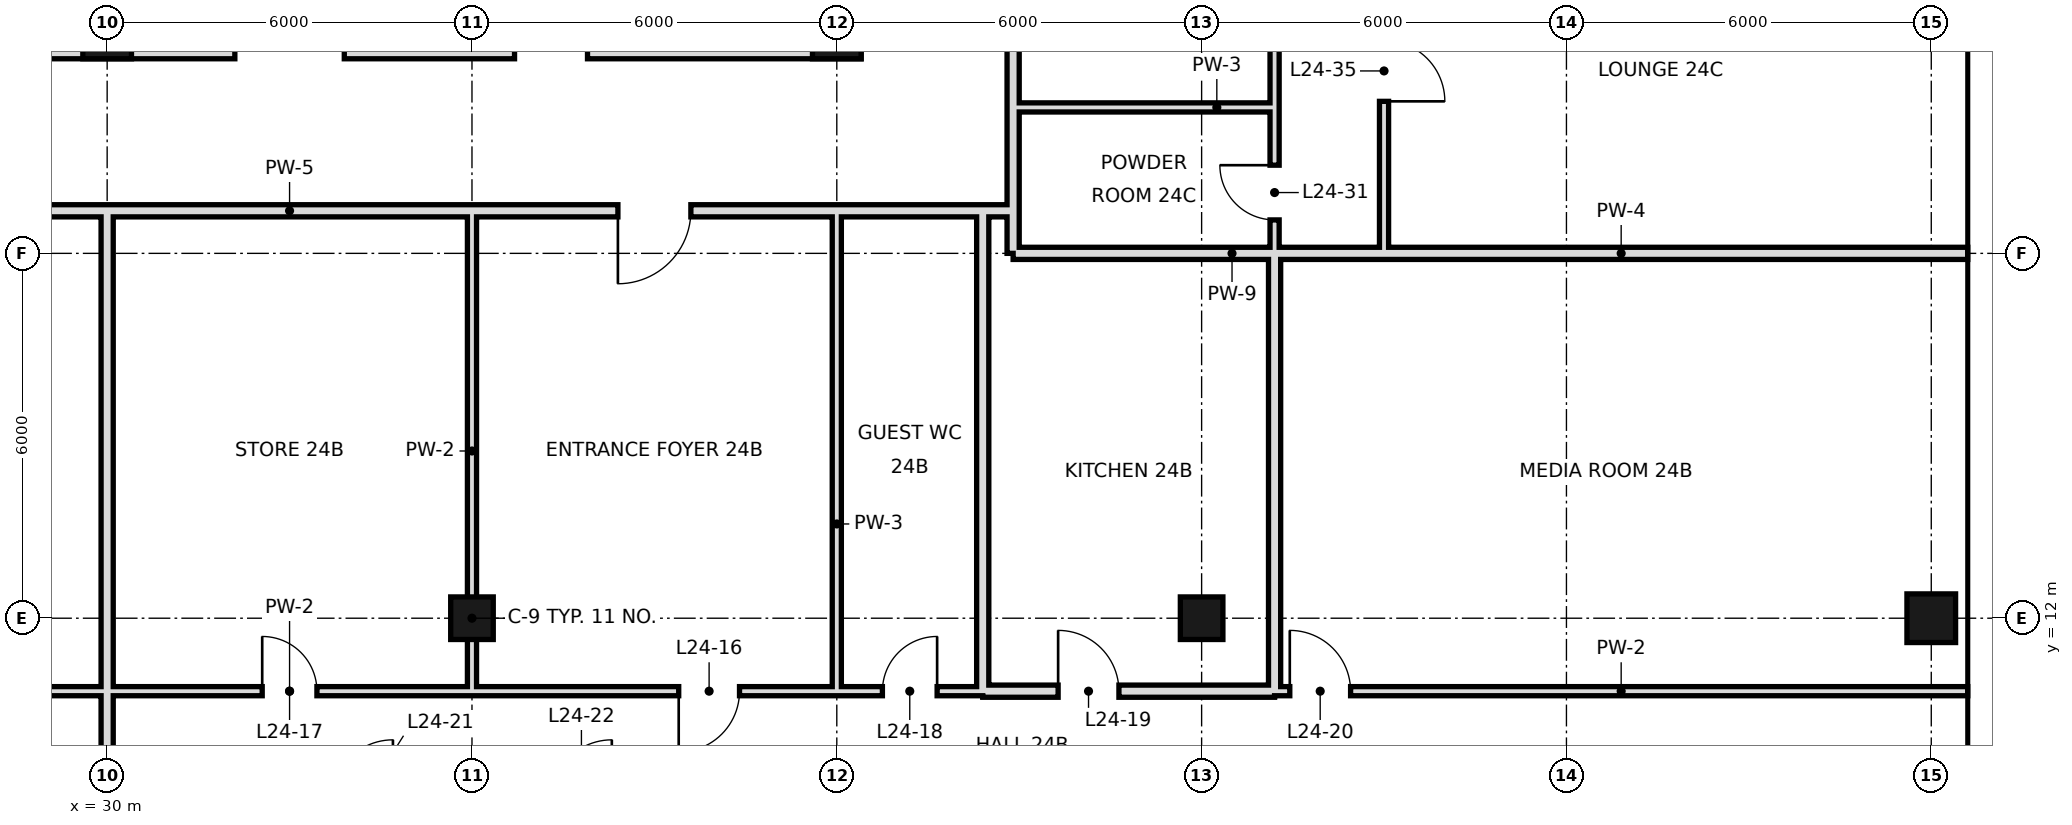
"""IFC4 building model, lengths in metres.
Left out: names, types, materials, properties, quantities, classifications, styles, units other than length and angle.
Written with IfcOpenShell. Run it as: python <this file> out.ifc"""

import sys

from ifc_helpers import new_model, si_unit, direction, frame, frame_2d, origin, origin_2d, place, context, subcontext, project, spatial, rectangle, hollow_rectangle, extrude, element, fill, save


model = new_model("IFC4")
c1 = context("Model", 3, precision=1e-05, world=origin(), true_north=direction((0.0, 1.0)))
c2 = subcontext(c1, "Body", "Model", "MODEL_VIEW")
j1 = project(units=[si_unit("LENGTHUNIT", "METRE"), si_unit("PLANEANGLEUNIT", "RADIAN")], contexts=[c1])
p1 = place(None, origin())
s1 = spatial("IfcSite", under=j1, at=p1, CompositionType="ELEMENT")
p2 = place(p1, origin())
s2 = spatial("IfcBuilding", under=s1, at=p2, CompositionType="ELEMENT")
p3 = place(p2, frame((0.0, 0.0, 110.6)))
s3 = spatial("IfcBuildingStorey", under=s2, at=p3, CompositionType="ELEMENT", Elevation=110.6)
p4 = place(p3, frame((30.0, 21.6, 0.0), z_axis=(0.0, 0.0, 1.0), x_axis=(1.0, 0.0, 0.0)))
e1 = element("IfcColumn", 1, at=p4, inside=s3, PredefinedType="COLUMN", context=c2, shape_type="SweptSolid", body=[
    extrude(hollow_rectangle(XDim=0.8, YDim=0.8, WallThickness=0.05, at=origin_2d()), origin(), (0.0, 0.0, 1.0), 3.6),
])
p5 = place(p3, frame((36.0, 12.0, 0.0), z_axis=(0.0, 0.0, 1.0), x_axis=(1.0, 0.0, 0.0)))
e2 = element("IfcColumn", 2, at=p5, inside=s3, PredefinedType="COLUMN", context=c2, shape_type="SweptSolid", body=[
    extrude(hollow_rectangle(XDim=0.7, YDim=0.7, WallThickness=0.036, at=origin_2d()), origin(), (0.0, 0.0, 1.0), 3.6),
])
p6 = place(p3, frame((42.0, 21.6, 0.0), z_axis=(0.0, 0.0, 1.0), x_axis=(1.0, 0.0, 0.0)))
e3 = element("IfcColumn", 3, at=p6, inside=s3, PredefinedType="COLUMN", context=c2, shape_type="SweptSolid", body=[
    extrude(hollow_rectangle(XDim=0.8, YDim=0.8, WallThickness=0.05, at=origin_2d()), origin(), (0.0, 0.0, 1.0), 3.6),
])
p7 = place(p3, frame((48.0, 12.0, 0.0), z_axis=(0.0, 0.0, 1.0), x_axis=(1.0, 0.0, 0.0)))
e4 = element("IfcColumn", 4, at=p7, inside=s3, PredefinedType="COLUMN", context=c2, shape_type="SweptSolid", body=[
    extrude(hollow_rectangle(XDim=0.7, YDim=0.7, WallThickness=0.036, at=origin_2d()), origin(), (0.0, 0.0, 1.0), 3.6),
])
p8 = place(p3, frame((60.0, 12.0, 0.0), z_axis=(0.0, 0.0, 1.0), x_axis=(1.0, 0.0, 0.0)))
e5 = element("IfcColumn", 5, at=p8, inside=s3, PredefinedType="COLUMN", context=c2, shape_type="SweptSolid", body=[
    extrude(hollow_rectangle(XDim=0.8, YDim=0.8, WallThickness=0.04, at=origin_2d()), origin(), (0.0, 0.0, 1.0), 3.6),
])
p9 = place(p3, frame((30.0, -0.6, 0.0), z_axis=(0.0, 0.0, 1.0), x_axis=(0.0, 1.0, 0.0)))
e6 = element("IfcWall", 6, at=p9, inside=s3, PredefinedType="SOLIDWALL", context=c2, shape_type="SweptSolid", body=[
    extrude(rectangle(XDim=19.3, YDim=0.2, at=frame_2d((9.65, 0.0))), origin(), (0.0, 0.0, 1.0), 2.68),
])
for number, where, z_axis, x_axis in (
    (7, (36.0, 10.8, 0.0), (0.0, 0.0, 1.0), (0.0, 1.0, 0.0)),
    (8, (42.0, 10.8, 0.0), (0.0, 0.0, 1.0), (0.0, 1.0, 0.0)),
):
    element("IfcWall", number, at=place(p3, frame(where, z_axis=z_axis, x_axis=x_axis)), inside=s3, PredefinedType="PARTITIONING", context=c2, shape_type="SweptSolid", body=[
        extrude(rectangle(XDim=7.9, YDim=0.15, at=frame_2d((3.95, 0.0))), origin(), (0.0, 0.0, 1.0), 2.68),
    ])
p10 = place(p3, frame((44.4, 10.8, 0.0), z_axis=(0.0, 0.0, 1.0), x_axis=(0.0, 1.0, 0.0)))
e9 = element("IfcWall", 9, at=p10, inside=s3, PredefinedType="SOLIDWALL", context=c2, shape_type="SweptSolid", body=[
    extrude(rectangle(XDim=7.9, YDim=0.2, at=frame_2d((3.95, 0.0))), origin(), (0.0, 0.0, 1.0), 2.68),
])
p11 = place(p3, frame((44.9, 18.7, 0.0), z_axis=(0.0, 0.0, 1.0), x_axis=(0.0, 1.0, 0.0)))
e10 = element("IfcWall", 10, at=p11, inside=s3, PredefinedType="SOLIDWALL", context=c2, shape_type="SweptSolid", body=[
    extrude(rectangle(XDim=19.7, YDim=0.2, at=frame_2d((9.85, 0.0))), origin(), (0.0, 0.0, 1.0), 2.93),
])
p12 = place(p11, frame((16.96, 0.0, 0.0)))
e11 = element("IfcOpeningElement", 11, at=p12, cuts=e10, PredefinedType="OPENING", context=c2, shape_type="SweptSolid", body=[
    extrude(rectangle(XDim=1.2, YDim=2.4, at=frame_2d((0.6, 1.2))), frame((0.0, 0.11, 0.0), z_axis=(0.0, -1.0, 0.0), x_axis=(1.0, 0.0, 0.0)), (0.0, 0.0, 1.0), 0.22),
])
p13 = place(p3, frame((44.9, 18.0, 0.0), z_axis=(0.0, 0.0, 1.0), x_axis=(0.0, 1.0, 0.0)))
e12 = element("IfcWall", 12, at=p13, inside=s3, PredefinedType="SOLIDWALL", context=c2, shape_type="SweptSolid", body=[
    extrude(rectangle(XDim=0.7, YDim=0.2, at=frame_2d((0.35, 0.0))), origin(), (0.0, 0.0, 1.0), 2.93),
])
p14 = place(p3, frame((49.2, 10.8, 0.0), z_axis=(0.0, 0.0, 1.0), x_axis=(0.0, 1.0, 0.0)))
e13 = element("IfcWall", 13, at=p14, inside=s3, PredefinedType="SOLIDWALL", context=c2, shape_type="SweptSolid", body=[
    extrude(rectangle(XDim=7.2, YDim=0.2, at=frame_2d((3.6, 0.0))), origin(), (0.0, 0.0, 1.0), 2.68),
])
p15 = place(p3, frame((49.2, 20.4, 0.0), z_axis=(0.0, 0.0, 1.0), x_axis=(0.0, 1.0, 0.0)))
e14 = element("IfcWall", 14, at=p15, inside=s3, PredefinedType="PARTITIONING", context=c2, shape_type="SweptSolid", body=[
    extrude(rectangle(XDim=18.0, YDim=0.15, at=frame_2d((9.0, 0.0))), origin(), (0.0, 0.0, 1.0), 3.38),
])
p16 = place(p15, frame((13.6, 0.0, 0.0)))
e15 = element("IfcOpeningElement", 15, at=p16, cuts=e14, PredefinedType="OPENING", context=c2, shape_type="SweptSolid", body=[
    extrude(rectangle(XDim=1.0, YDim=2.4, at=frame_2d((0.5, 1.2))), frame((0.0, 0.085, 0.0), z_axis=(0.0, -1.0, 0.0), x_axis=(1.0, 0.0, 0.0)), (0.0, 0.0, 1.0), 0.17),
])
p17 = place(p15, frame((7.6, 0.0, 0.0)))
e16 = element("IfcOpeningElement", 16, at=p17, cuts=e14, PredefinedType="OPENING", context=c2, shape_type="SweptSolid", body=[
    extrude(rectangle(XDim=1.0, YDim=2.4, at=frame_2d((0.5, 1.2))), frame((0.0, 0.085, 0.0), z_axis=(0.0, -1.0, 0.0), x_axis=(1.0, 0.0, 0.0)), (0.0, 0.0, 1.0), 0.17),
])
p18 = place(p3, frame((49.2, 18.0, 0.0), z_axis=(0.0, 0.0, 1.0), x_axis=(0.0, 1.0, 0.0)))
e17 = element("IfcWall", 17, at=p18, inside=s3, PredefinedType="PARTITIONING", context=c2, shape_type="SweptSolid", body=[
    extrude(rectangle(XDim=2.4, YDim=0.15, at=frame_2d((1.2, 0.0))), origin(), (0.0, 0.0, 1.0), 3.38),
])
p19 = place(p18, frame((0.55, 0.0, 0.0)))
e18 = element("IfcOpeningElement", 18, at=p19, cuts=e17, PredefinedType="OPENING", context=c2, shape_type="SweptSolid", body=[
    extrude(rectangle(XDim=0.9, YDim=2.4, at=frame_2d((0.45, 1.2))), frame((0.0, 0.085, 0.0), z_axis=(0.0, -1.0, 0.0), x_axis=(1.0, 0.0, 0.0)), (0.0, 0.0, 1.0), 0.17),
])
p20 = place(p3, frame((51.0, 18.0, 0.0), z_axis=(0.0, 0.0, 1.0), x_axis=(0.0, 1.0, 0.0)))
e19 = element("IfcWall", 19, at=p20, inside=s3, PredefinedType="PARTITIONING", context=c2, shape_type="SweptSolid", body=[
    extrude(rectangle(XDim=8.4, YDim=0.15, at=frame_2d((4.2, 0.0))), origin(), (0.0, 0.0, 1.0), 3.38),
])
p21 = place(p20, frame((2.5, 0.0, 0.0)))
e20 = element("IfcOpeningElement", 20, at=p21, cuts=e19, PredefinedType="OPENING", context=c2, shape_type="SweptSolid", body=[
    extrude(rectangle(XDim=1.0, YDim=2.4, at=frame_2d((0.5, 1.2))), frame((0.0, 0.085, 0.0), z_axis=(0.0, -1.0, 0.0), x_axis=(1.0, 0.0, 0.0)), (0.0, 0.0, 1.0), 0.17),
])
p22 = place(p20, frame((6.52, 0.0, 0.0)))
e21 = element("IfcOpeningElement", 21, at=p22, cuts=e19, PredefinedType="OPENING", context=c2, shape_type="SweptSolid", body=[
    extrude(rectangle(XDim=1.0, YDim=2.4, at=frame_2d((0.5, 1.2))), frame((0.0, 0.085, 0.0), z_axis=(0.0, -1.0, 0.0), x_axis=(1.0, 0.0, 0.0)), (0.0, 0.0, 1.0), 0.17),
])
p23 = place(p3, frame((44.4, 10.8, 0.0), z_axis=(0.0, 0.0, 1.0), x_axis=(1.0, 0.0, 0.0)))
e22 = element("IfcWall", 22, at=p23, inside=s3, PredefinedType="SOLIDWALL", context=c2, shape_type="SweptSolid", body=[
    extrude(rectangle(XDim=4.8, YDim=0.2, at=frame_2d((2.4, 0.0))), origin(), (0.0, 0.0, 1.0), 2.68),
])
p24 = place(p23, frame((1.24, 0.0, 0.0)))
e23 = element("IfcOpeningElement", 23, at=p24, cuts=e22, PredefinedType="OPENING", context=c2, shape_type="SweptSolid", body=[
    extrude(rectangle(XDim=1.0, YDim=2.4, at=frame_2d((0.5, 1.2))), frame((0.0, 0.11, 0.0), z_axis=(0.0, -1.0, 0.0), x_axis=(1.0, 0.0, 0.0)), (0.0, 0.0, 1.0), 0.22),
])
p25 = place(p3, frame((24.0, 10.8, 0.0), z_axis=(0.0, 0.0, 1.0), x_axis=(1.0, 0.0, 0.0)))
e24 = element("IfcWall", 24, at=p25, inside=s3, PredefinedType="PARTITIONING", context=c2, shape_type="SweptSolid", body=[
    extrude(rectangle(XDim=18.0, YDim=0.15, at=frame_2d((9.0, 0.0))), origin(), (0.0, 0.0, 1.0), 3.38),
])
p26 = place(p25, frame((2.5, 0.0, 0.0)))
e25 = element("IfcOpeningElement", 25, at=p26, cuts=e24, PredefinedType="OPENING", context=c2, shape_type="SweptSolid", body=[
    extrude(rectangle(XDim=1.0, YDim=2.4, at=frame_2d((0.5, 1.2))), frame((0.0, 0.085, 0.0), z_axis=(0.0, -1.0, 0.0), x_axis=(1.0, 0.0, 0.0)), (0.0, 0.0, 1.0), 0.17),
])
p27 = place(p25, frame((15.4, 0.0, 0.0)))
e26 = element("IfcOpeningElement", 26, at=p27, cuts=e24, PredefinedType="OPENING", context=c2, shape_type="SweptSolid", body=[
    extrude(rectangle(XDim=1.0, YDim=2.4, at=frame_2d((0.5, 1.2))), frame((0.0, 0.085, 0.0), z_axis=(0.0, -1.0, 0.0), x_axis=(1.0, 0.0, 0.0)), (0.0, 0.0, 1.0), 0.17),
])
p28 = place(p25, frame((8.55, 0.0, 0.0)))
e27 = element("IfcOpeningElement", 27, at=p28, cuts=e24, PredefinedType="OPENING", context=c2, shape_type="SweptSolid", body=[
    extrude(rectangle(XDim=0.9, YDim=2.1, at=frame_2d((0.45, 1.05))), frame((0.0, 0.085, 0.0), z_axis=(0.0, -1.0, 0.0), x_axis=(1.0, 0.0, 0.0)), (0.0, 0.0, 1.0), 0.17),
])
p29 = place(p3, frame((49.2, 10.8, 0.0), z_axis=(0.0, 0.0, 1.0), x_axis=(1.0, 0.0, 0.0)))
e28 = element("IfcWall", 28, at=p29, inside=s3, PredefinedType="PARTITIONING", context=c2, shape_type="SweptSolid", body=[
    extrude(rectangle(XDim=11.4, YDim=0.15, at=frame_2d((5.7, 0.0))), origin(), (0.0, 0.0, 1.0), 3.38),
])
p30 = place(p29, frame((0.25, 0.0, 0.0)))
e29 = element("IfcOpeningElement", 29, at=p30, cuts=e28, PredefinedType="OPENING", context=c2, shape_type="SweptSolid", body=[
    extrude(rectangle(XDim=1.0, YDim=2.4, at=frame_2d((0.5, 1.2))), frame((0.0, 0.085, 0.0), z_axis=(0.0, -1.0, 0.0), x_axis=(1.0, 0.0, 0.0)), (0.0, 0.0, 1.0), 0.17),
])
p31 = place(p3, frame((42.0, 10.8, 0.0), z_axis=(0.0, 0.0, 1.0), x_axis=(1.0, 0.0, 0.0)))
e30 = element("IfcWall", 30, at=p31, inside=s3, PredefinedType="PARTITIONING", context=c2, shape_type="SweptSolid", body=[
    extrude(rectangle(XDim=2.4, YDim=0.15, at=frame_2d((1.2, 0.0))), origin(), (0.0, 0.0, 1.0), 3.38),
])
p32 = place(p31, frame((0.75, 0.0, 0.0)))
e31 = element("IfcOpeningElement", 31, at=p32, cuts=e30, PredefinedType="OPENING", context=c2, shape_type="SweptSolid", body=[
    extrude(rectangle(XDim=0.9, YDim=2.4, at=frame_2d((0.45, 1.2))), frame((0.0, 0.085, 0.0), z_axis=(0.0, -1.0, 0.0), x_axis=(1.0, 0.0, 0.0)), (0.0, 0.0, 1.0), 0.17),
])
p33 = place(p3, frame((44.9, 18.0, 0.0), z_axis=(0.0, 0.0, 1.0), x_axis=(1.0, 0.0, 0.0)))
e32 = element("IfcWall", 32, at=p33, inside=s3, PredefinedType="SOLIDWALL", context=c2, shape_type="SweptSolid", body=[
    extrude(rectangle(XDim=4.3, YDim=0.2, at=frame_2d((2.15, 0.0))), origin(), (0.0, 0.0, 1.0), 2.68),
])
p34 = place(p3, frame((49.2, 18.0, 0.0), z_axis=(0.0, 0.0, 1.0), x_axis=(1.0, 0.0, 0.0)))
e33 = element("IfcWall", 33, at=p34, inside=s3, PredefinedType="SOLIDWALL", context=c2, shape_type="SweptSolid", body=[
    extrude(rectangle(XDim=11.4, YDim=0.2, at=frame_2d((5.7, 0.0))), origin(), (0.0, 0.0, 1.0), 2.68),
])
p35 = place(p3, frame((21.6, 18.7, 0.0), z_axis=(0.0, 0.0, 1.0), x_axis=(1.0, 0.0, 0.0)))
e34 = element("IfcWall", 34, at=p35, inside=s3, PredefinedType="SOLIDWALL", context=c2, shape_type="SweptSolid", body=[
    extrude(rectangle(XDim=22.8, YDim=0.2, at=frame_2d((11.4, 0.0))), origin(), (0.0, 0.0, 1.0), 2.68),
])
p36 = place(p35, frame((4.8, 0.0, 0.0)))
e35 = element("IfcOpeningElement", 35, at=p36, cuts=e34, PredefinedType="OPENING", context=c2, shape_type="SweptSolid", body=[
    extrude(rectangle(XDim=1.2, YDim=2.4, at=frame_2d((0.6, 1.2))), frame((0.0, 0.11, 0.0), z_axis=(0.0, -1.0, 0.0), x_axis=(1.0, 0.0, 0.0)), (0.0, 0.0, 1.0), 0.22),
])
p37 = place(p35, frame((16.8, 0.0, 0.0)))
e36 = element("IfcOpeningElement", 36, at=p37, cuts=e34, PredefinedType="OPENING", context=c2, shape_type="SweptSolid", body=[
    extrude(rectangle(XDim=1.2, YDim=2.4, at=frame_2d((0.6, 1.2))), frame((0.0, 0.11, 0.0), z_axis=(0.0, -1.0, 0.0), x_axis=(1.0, 0.0, 0.0)), (0.0, 0.0, 1.0), 0.22),
])
p38 = place(p3, frame((44.4, 18.7, 0.0), z_axis=(0.0, 0.0, 1.0), x_axis=(1.0, 0.0, 0.0)))
e37 = element("IfcWall", 37, at=p38, inside=s3, PredefinedType="SOLIDWALL", context=c2, shape_type="SweptSolid", body=[
    extrude(rectangle(XDim=0.5, YDim=0.2, at=frame_2d((0.25, 0.0))), origin(), (0.0, 0.0, 1.0), 3.38),
])
p39 = place(p3, frame((44.9, 20.4, 0.0), z_axis=(0.0, 0.0, 1.0), x_axis=(1.0, 0.0, 0.0)))
e38 = element("IfcWall", 38, at=p39, inside=s3, PredefinedType="PARTITIONING", context=c2, shape_type="SweptSolid", body=[
    extrude(rectangle(XDim=4.3, YDim=0.15, at=frame_2d((2.15, 0.0))), origin(), (0.0, 0.0, 1.0), 3.38),
])
p40 = place(p3, frame((5.6, 21.4, 0.0), z_axis=(0.0, 0.0, 1.0), x_axis=(1.0, 0.0, 0.0)))
e39 = element("IfcWall", 39, at=p40, inside=s3, PredefinedType="SOLIDWALL", context=c2, shape_type="SweptSolid", body=[
    extrude(rectangle(XDim=36.8, YDim=0.4, at=frame_2d((18.4, 0.0))), origin(), (0.0, 0.0, 1.0), 3.38),
])
p41 = place(p40, frame((8.5, 0.0, 0.0)))
e40 = element("IfcOpeningElement", 40, at=p41, cuts=e39, PredefinedType="OPENING", context=c2, shape_type="SweptSolid", body=[
    extrude(rectangle(XDim=1.8, YDim=2.1, at=frame_2d((0.9, 1.05))), frame((0.0, 0.21, 0.0), z_axis=(0.0, -1.0, 0.0), x_axis=(1.0, 0.0, 0.0)), (0.0, 0.0, 1.0), 0.42),
])
p42 = place(p40, frame((17.5, 0.0, 0.0)))
e41 = element("IfcOpeningElement", 41, at=p42, cuts=e39, PredefinedType="OPENING", context=c2, shape_type="SweptSolid", body=[
    extrude(rectangle(XDim=1.8, YDim=2.1, at=frame_2d((0.9, 1.05))), frame((0.0, 0.21, 0.0), z_axis=(0.0, -1.0, 0.0), x_axis=(1.0, 0.0, 0.0)), (0.0, 0.0, 1.0), 0.42),
])
p43 = place(p40, frame((26.5, 0.0, 0.0)))
e42 = element("IfcOpeningElement", 42, at=p43, cuts=e39, PredefinedType="OPENING", context=c2, shape_type="SweptSolid", body=[
    extrude(rectangle(XDim=1.8, YDim=2.1, at=frame_2d((0.9, 1.05))), frame((0.0, 0.21, 0.0), z_axis=(0.0, -1.0, 0.0), x_axis=(1.0, 0.0, 0.0)), (0.0, 0.0, 1.0), 0.42),
])
p44 = place(p40, frame((4.5, 0.0, 0.0)))
e43 = element("IfcOpeningElement", 43, at=p44, cuts=e39, PredefinedType="OPENING", context=c2, shape_type="SweptSolid", body=[
    extrude(rectangle(XDim=1.2, YDim=2.1, at=frame_2d((0.6, 1.05))), frame((0.0, 0.21, 0.0), z_axis=(0.0, -1.0, 0.0), x_axis=(1.0, 0.0, 0.0)), (0.0, 0.0, 1.0), 0.42),
])
p45 = place(p40, frame((31.1, 0.0, 0.0)))
e44 = element("IfcOpeningElement", 44, at=p45, cuts=e39, PredefinedType="OPENING", context=c2, shape_type="SweptSolid", body=[
    extrude(rectangle(XDim=1.2, YDim=2.1, at=frame_2d((0.6, 1.05))), frame((0.0, 0.21, 0.0), z_axis=(0.0, -1.0, 0.0), x_axis=(1.0, 0.0, 0.0)), (0.0, 0.0, 1.0), 0.42),
])
p46 = place(p27, frame((1.0, 0.0, 0.0), z_axis=(0.0, 0.0, 1.0), x_axis=(-1.0, 0.0, 0.0)))
e45 = element("IfcDoor", 45, at=p46, inside=s3, OperationType="SINGLE_SWING_RIGHT", PredefinedType="DOOR", context=c2, shape_type="SweptSolid", body=[
    extrude(rectangle(XDim=1.0, YDim=2.4, at=frame_2d((0.5, 1.2))), frame((0.0, 0.025, 0.0), z_axis=(0.0, -1.0, 0.0), x_axis=(1.0, 0.0, 0.0)), (0.0, 0.0, 1.0), 0.05),
])
fill(e26, e45)
p47 = place(p28, origin())
e46 = element("IfcDoor", 46, at=p47, inside=s3, OperationType="SINGLE_SWING_LEFT", PredefinedType="DOOR", context=c2, shape_type="SweptSolid", body=[
    extrude(rectangle(XDim=0.9, YDim=2.1, at=frame_2d((0.45, 1.05))), frame((0.0, 0.025, 0.0), z_axis=(0.0, -1.0, 0.0), x_axis=(1.0, 0.0, 0.0)), (0.0, 0.0, 1.0), 0.05),
])
fill(e27, e46)
p48 = place(p32, frame((0.9, 0.0, 0.0), z_axis=(0.0, 0.0, 1.0), x_axis=(-1.0, 0.0, 0.0)))
e47 = element("IfcDoor", 47, at=p48, inside=s3, OperationType="SINGLE_SWING_LEFT", PredefinedType="DOOR", context=c2, shape_type="SweptSolid", body=[
    extrude(rectangle(XDim=0.9, YDim=2.4, at=frame_2d((0.45, 1.2))), frame((0.0, 0.025, 0.0), z_axis=(0.0, -1.0, 0.0), x_axis=(1.0, 0.0, 0.0)), (0.0, 0.0, 1.0), 0.05),
])
fill(e31, e47)
p49 = place(p24, origin())
e48 = element("IfcDoor", 48, at=p49, inside=s3, OperationType="SINGLE_SWING_LEFT", PredefinedType="DOOR", context=c2, shape_type="SweptSolid", body=[
    extrude(rectangle(XDim=1.0, YDim=2.4, at=frame_2d((0.5, 1.2))), frame((0.0, 0.025, 0.0), z_axis=(0.0, -1.0, 0.0), x_axis=(1.0, 0.0, 0.0)), (0.0, 0.0, 1.0), 0.05),
])
fill(e23, e48)
p50 = place(p30, origin())
e49 = element("IfcDoor", 49, at=p50, inside=s3, OperationType="SINGLE_SWING_LEFT", PredefinedType="DOOR", context=c2, shape_type="SweptSolid", body=[
    extrude(rectangle(XDim=1.0, YDim=2.4, at=frame_2d((0.5, 1.2))), frame((0.0, 0.025, 0.0), z_axis=(0.0, -1.0, 0.0), x_axis=(1.0, 0.0, 0.0)), (0.0, 0.0, 1.0), 0.05),
])
fill(e29, e49)
p51 = place(p19, frame((0.9, 0.0, 0.0), z_axis=(0.0, 0.0, 1.0), x_axis=(-1.0, 0.0, 0.0)))
e50 = element("IfcDoor", 50, at=p51, inside=s3, OperationType="SINGLE_SWING_LEFT", PredefinedType="DOOR", context=c2, shape_type="SweptSolid", body=[
    extrude(rectangle(XDim=0.9, YDim=2.4, at=frame_2d((0.45, 1.2))), frame((0.0, 0.025, 0.0), z_axis=(0.0, -1.0, 0.0), x_axis=(1.0, 0.0, 0.0)), (0.0, 0.0, 1.0), 0.05),
])
fill(e18, e50)
p52 = place(p21, frame((1.0, 0.0, 0.0), z_axis=(0.0, 0.0, 1.0), x_axis=(-1.0, 0.0, 0.0)))
e51 = element("IfcDoor", 51, at=p52, inside=s3, OperationType="SINGLE_SWING_RIGHT", PredefinedType="DOOR", context=c2, shape_type="SweptSolid", body=[
    extrude(rectangle(XDim=1.0, YDim=2.4, at=frame_2d((0.5, 1.2))), frame((0.0, 0.025, 0.0), z_axis=(0.0, -1.0, 0.0), x_axis=(1.0, 0.0, 0.0)), (0.0, 0.0, 1.0), 0.05),
])
fill(e20, e51)
p53 = place(p37, frame((1.2, 0.0, 0.0), z_axis=(0.0, 0.0, 1.0), x_axis=(-1.0, 0.0, 0.0)))
e52 = element("IfcDoor", 52, at=p53, inside=s3, OperationType="SINGLE_SWING_RIGHT", PredefinedType="DOOR", context=c2, shape_type="SweptSolid", body=[
    extrude(rectangle(XDim=1.2, YDim=2.4, at=frame_2d((0.6, 1.2))), frame((0.0, 0.025, 0.0), z_axis=(0.0, -1.0, 0.0), x_axis=(1.0, 0.0, 0.0)), (0.0, 0.0, 1.0), 0.05),
])
fill(e36, e52)
save(model, sys.argv[1])
